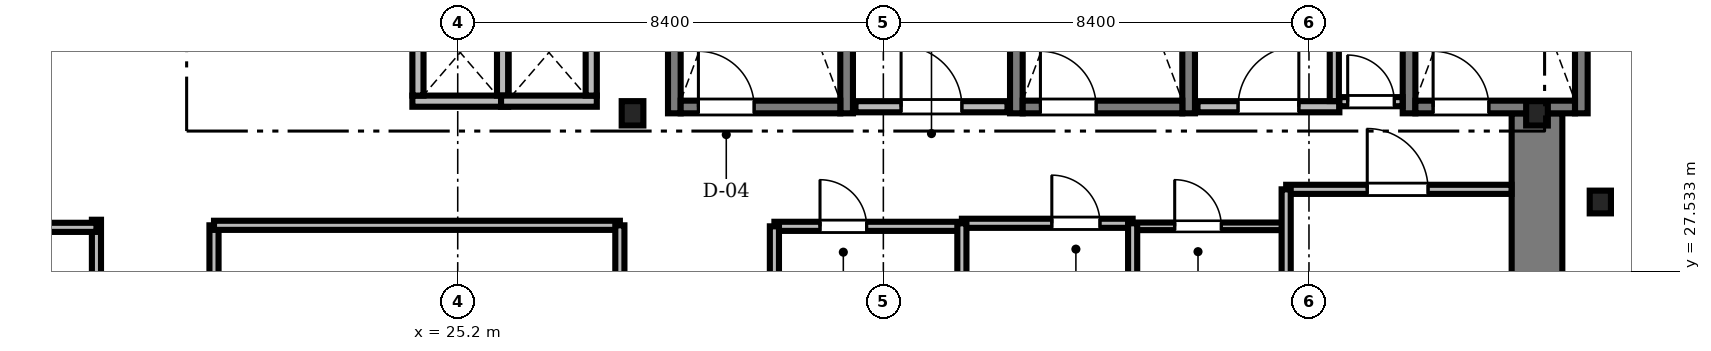
"""IFC4 building model, lengths in metres.
Left out: names, types, materials, properties, quantities, classifications, styles, units other than length and angle.
Written with IfcOpenShell. Run it as: python <this file> out.ifc"""

import sys

from ifc_helpers import new_model, si_unit, direction, frame, frame_2d, origin, origin_2d, place, context, subcontext, project, spatial, rectangle, i_section, extrude, source, transform, mapped, element, fill, save


model = new_model("IFC4")
c1 = context("Model", 3, precision=1e-05, world=origin(), true_north=direction((0.0, 1.0)))
c2 = subcontext(c1, "Body", "Model", "MODEL_VIEW")
j1 = project(units=[si_unit("LENGTHUNIT", "METRE"), si_unit("PLANEANGLEUNIT", "RADIAN")], contexts=[c1])
p1 = place(None, origin())
s1 = spatial("IfcSite", under=j1, at=p1, CompositionType="ELEMENT")
p2 = place(p1, origin())
s2 = spatial("IfcBuilding", under=s1, at=p2, CompositionType="ELEMENT")
p3 = place(p2, frame((0.0, 0.0, 89.65)))
s3 = spatial("IfcBuildingStorey", under=s2, at=p3, CompositionType="ELEMENT", Elevation=89.65)
m1 = source(origin(), c2, "Body", "SweptSolid", [
    extrude(rectangle(XDim=13.15, YDim=1.0, at=frame_2d((6.575, 0.0))), origin(), (0.0, 0.0, 1.0), 3.0),
])
p4 = place(p3, frame((46.5, 17.5, 0.0), z_axis=(0.0, 0.0, 1.0), x_axis=(0.0, 1.0, 0.0)))
e1 = element("IfcWall", 1, at=p4, inside=s3, PredefinedType="SHEAR", context=c2, shape_type="MappedRepresentation", body=[
    mapped(m1, transform((0.0, 0.0, 0.0), scale=1.0)),
])
m2 = source(origin(), c2, "Body", "SweptSolid", [
    extrude(i_section(OverallWidth=0.428, OverallDepth=0.481, WebThickness=0.04, FlangeThickness=0.063, FilletRadius=0.015, at=origin_2d()), origin(), (0.0, 0.0, 1.0), 3.0),
])
for number, where, z_axis, x_axis in (
    (2, (28.65, 30.65, 0.0), (0.0, 0.0, 1.0), (1.0, 0.0, 0.0)),
    (3, (46.5, 30.65, 0.0), (0.0, 0.0, 1.0), (1.0, 0.0, 0.0)),
):
    element("IfcColumn", number, at=place(p3, frame(where, z_axis=z_axis, x_axis=x_axis)), inside=s3, PredefinedType="COLUMN", context=c2, shape_type="MappedRepresentation", body=[
        mapped(m2, transform((0.0, 0.0, 0.0), scale=1.0)),
    ])
m3 = source(origin(), c2, "Body", "SweptSolid", [
    extrude(i_section(OverallWidth=0.419, OverallDepth=0.449, WebThickness=0.031, FlangeThickness=0.048, FilletRadius=0.015, at=origin_2d()), origin(), (0.0, 0.0, 1.0), 3.0),
])
p5 = place(p3, frame((47.75, 28.9, 0.0), z_axis=(0.0, 0.0, 1.0), x_axis=(1.0, 0.0, 0.0)))
e4 = element("IfcColumn", 4, at=p5, inside=s3, PredefinedType="COLUMN", context=c2, shape_type="MappedRepresentation", body=[
    mapped(m3, transform((0.0, 0.0, 0.0), scale=1.0)),
])
m4 = source(origin(), c2, "Body", "SweptSolid", [
    extrude(rectangle(XDim=9.15, YDim=0.25, at=frame_2d((4.575, 0.0))), origin(), (0.0, 0.0, 1.0), 3.45),
])
for number, where, z_axis, x_axis in (
    (5, (29.475, 30.65, 0.0), (0.0, 0.0, 1.0), (0.0, 1.0, 0.0)),
    (6, (32.875, 30.65, 0.0), (0.0, 0.0, 1.0), (0.0, 1.0, 0.0)),
):
    element("IfcWall", number, at=place(p3, frame(where, z_axis=z_axis, x_axis=x_axis)), inside=s3, PredefinedType="SOLIDWALL", context=c2, shape_type="MappedRepresentation", body=[
        mapped(m4, transform((0.0, 0.0, 0.0), scale=1.0)),
    ])
m5 = source(origin(), c2, "Body", "SweptSolid", [
    extrude(rectangle(XDim=3.15, YDim=0.25, at=frame_2d((1.575, 0.0))), origin(), (0.0, 0.0, 1.0), 3.45),
])
p6 = place(p3, frame((29.6, 30.775, 0.0), z_axis=(0.0, 0.0, 1.0), x_axis=(1.0, 0.0, 0.0)))
e7 = element("IfcWall", 7, at=p6, inside=s3, PredefinedType="SOLIDWALL", context=c2, shape_type="MappedRepresentation", body=[
    mapped(m5, transform((0.0, 0.0, 0.0), scale=1.0)),
])
m6 = source(origin(), c2, "Body", "SweptSolid", [
    extrude(rectangle(XDim=1.1, YDim=2.2, at=frame_2d((0.55, 1.1))), frame((0.0, 0.135, 0.0), z_axis=(0.0, -1.0, 0.0), x_axis=(1.0, 0.0, 0.0)), (0.0, 0.0, 1.0), 0.27),
])
p7 = place(p6, frame((0.35, 0.0, 0.0)))
e8 = element("IfcOpeningElement", 8, at=p7, cuts=e7, PredefinedType="OPENING", context=c2, shape_type="MappedRepresentation", body=[
    mapped(m6, transform((0.0, 0.0, 0.0), scale=1.0)),
])
for number, where, z_axis, x_axis in (
    (9, (36.225, 30.65, 0.0), (0.0, 0.0, 1.0), (0.0, 1.0, 0.0)),
    (10, (39.625, 30.65, 0.0), (0.0, 0.0, 1.0), (0.0, 1.0, 0.0)),
):
    element("IfcWall", number, at=place(p3, frame(where, z_axis=z_axis, x_axis=x_axis)), inside=s3, PredefinedType="SOLIDWALL", context=c2, shape_type="MappedRepresentation", body=[
        mapped(m4, transform((0.0, 0.0, 0.0), scale=1.0)),
    ])
p8 = place(p3, frame((36.35, 30.775, 0.0), z_axis=(0.0, 0.0, 1.0), x_axis=(1.0, 0.0, 0.0)))
e11 = element("IfcWall", 11, at=p8, inside=s3, PredefinedType="SOLIDWALL", context=c2, shape_type="MappedRepresentation", body=[
    mapped(m5, transform((0.0, 0.0, 0.0), scale=1.0)),
])
p9 = place(p8, frame((0.35, 0.0, 0.0)))
e12 = element("IfcOpeningElement", 12, at=p9, cuts=e11, PredefinedType="OPENING", context=c2, shape_type="MappedRepresentation", body=[
    mapped(m6, transform((0.0, 0.0, 0.0), scale=1.0)),
])
for number, where, z_axis, x_axis in (
    (13, (43.975, 30.65, 0.0), (0.0, 0.0, 1.0), (0.0, 1.0, 0.0)),
    (14, (47.375, 30.65, 0.0), (0.0, 0.0, 1.0), (0.0, 1.0, 0.0)),
):
    element("IfcWall", number, at=place(p3, frame(where, z_axis=z_axis, x_axis=x_axis)), inside=s3, PredefinedType="SOLIDWALL", context=c2, shape_type="MappedRepresentation", body=[
        mapped(m4, transform((0.0, 0.0, 0.0), scale=1.0)),
    ])
p10 = place(p3, frame((44.1, 30.775, 0.0), z_axis=(0.0, 0.0, 1.0), x_axis=(1.0, 0.0, 0.0)))
e15 = element("IfcWall", 15, at=p10, inside=s3, PredefinedType="SOLIDWALL", context=c2, shape_type="MappedRepresentation", body=[
    mapped(m5, transform((0.0, 0.0, 0.0), scale=1.0)),
])
p11 = place(p10, frame((0.35, 0.0, 0.0)))
e16 = element("IfcOpeningElement", 16, at=p11, cuts=e15, PredefinedType="OPENING", context=c2, shape_type="MappedRepresentation", body=[
    mapped(m6, transform((0.0, 0.0, 0.0), scale=1.0)),
])
m7 = source(origin(), c2, "Body", "SweptSolid", [
    extrude(rectangle(XDim=3.0, YDim=0.22, at=frame_2d((1.5, 0.0))), origin(), (0.0, 0.0, 1.0), 3.0),
])
p12 = place(p3, frame((33.05, 30.78, 0.0), z_axis=(0.0, 0.0, 1.0), x_axis=(1.0, 0.0, 0.0)))
e17 = element("IfcWall", 17, at=p12, inside=s3, PredefinedType="SOLIDWALL", context=c2, shape_type="MappedRepresentation", body=[
    mapped(m7, transform((0.0, 0.0, 0.0), scale=1.0)),
])
m8 = source(origin(), c2, "Body", "SweptSolid", [
    extrude(rectangle(XDim=1.2, YDim=2.2, at=frame_2d((0.6, 1.1))), frame((0.0, 0.12, 0.0), z_axis=(0.0, -1.0, 0.0), x_axis=(1.0, 0.0, 0.0)), (0.0, 0.0, 1.0), 0.24),
])
p13 = place(p12, frame((0.9, 0.0, 0.0)))
e18 = element("IfcOpeningElement", 18, at=p13, cuts=e17, PredefinedType="OPENING", context=c2, shape_type="MappedRepresentation", body=[
    mapped(m8, transform((0.0, 0.0, 0.0), scale=1.0)),
])
m9 = source(origin(), c2, "Body", "SweptSolid", [
    extrude(rectangle(XDim=2.8, YDim=0.22, at=frame_2d((1.4, 0.0))), origin(), (0.0, 0.0, 1.0), 3.0),
])
p14 = place(p3, frame((39.8, 30.78, 0.0), z_axis=(0.0, 0.0, 1.0), x_axis=(1.0, 0.0, 0.0)))
e19 = element("IfcWall", 19, at=p14, inside=s3, PredefinedType="SOLIDWALL", context=c2, shape_type="MappedRepresentation", body=[
    mapped(m9, transform((0.0, 0.0, 0.0), scale=1.0)),
])
p15 = place(p14, frame((0.8, 0.0, 0.0)))
e20 = element("IfcOpeningElement", 20, at=p15, cuts=e19, PredefinedType="OPENING", context=c2, shape_type="MappedRepresentation", body=[
    mapped(m8, transform((0.0, 0.0, 0.0), scale=1.0)),
])
m10 = source(origin(), c2, "Body", "SweptSolid", [
    extrude(rectangle(XDim=1.89, YDim=0.22, at=frame_2d((0.945, 0.0))), origin(), (0.0, 0.0, 1.0), 3.0),
])
p16 = place(p3, frame((24.305, 30.89, 0.0), z_axis=(0.0, 0.0, 1.0), x_axis=(1.0, 0.0, 0.0)))
e21 = element("IfcWall", 21, at=p16, inside=s3, PredefinedType="SOLIDWALL", context=c2, shape_type="MappedRepresentation", body=[
    mapped(m10, transform((0.0, 0.0, 0.0), scale=1.0)),
])
m11 = source(origin(), c2, "Body", "SweptSolid", [
    extrude(rectangle(XDim=1.7, YDim=0.22, at=frame_2d((0.85, 0.0))), origin(), (0.0, 0.0, 1.0), 3.0),
])
for number, where, z_axis, x_axis in (
    (22, (24.415, 31.0, 0.0), (0.0, 0.0, 1.0), (0.0, 1.0, 0.0)),
    (23, (26.085, 31.0, 0.0), (0.0, 0.0, 1.0), (0.0, 1.0, 0.0)),
):
    element("IfcWall", number, at=place(p3, frame(where, z_axis=z_axis, x_axis=x_axis)), inside=s3, PredefinedType="SOLIDWALL", context=c2, shape_type="MappedRepresentation", body=[
        mapped(m11, transform((0.0, 0.0, 0.0), scale=1.0)),
    ])
p17 = place(p3, frame((26.055, 30.89, 0.0), z_axis=(0.0, 0.0, 1.0), x_axis=(1.0, 0.0, 0.0)))
e24 = element("IfcWall", 24, at=p17, inside=s3, PredefinedType="SOLIDWALL", context=c2, shape_type="MappedRepresentation", body=[
    mapped(m10, transform((0.0, 0.0, 0.0), scale=1.0)),
])
p18 = place(p3, frame((27.835, 31.0, 0.0), z_axis=(0.0, 0.0, 1.0), x_axis=(0.0, 1.0, 0.0)))
e25 = element("IfcWall", 25, at=p18, inside=s3, PredefinedType="SOLIDWALL", context=c2, shape_type="MappedRepresentation", body=[
    mapped(m11, transform((0.0, 0.0, 0.0), scale=1.0)),
])
m12 = source(origin(), c2, "Body", "SweptSolid", [
    extrude(rectangle(XDim=13.89, YDim=0.18, at=frame_2d((6.945, 0.0))), origin(), (0.0, 0.0, 1.0), 2.442),
])
p19 = place(p3, frame((18.07, 14.66, 0.0), z_axis=(0.0, 0.0, 1.0), x_axis=(0.0, 1.0, 0.0)))
e26 = element("IfcWall", 26, at=p19, inside=s3, PredefinedType="PARTITIONING", context=c2, shape_type="MappedRepresentation", body=[
    mapped(m12, transform((0.0, 0.0, 0.0), scale=1.0)),
])
m13 = source(origin(), c2, "Body", "SweptSolid", [
    extrude(rectangle(XDim=1.05, YDim=2.2, at=frame_2d((0.525, 1.1))), frame((0.0, 0.1, 0.0), z_axis=(0.0, -1.0, 0.0), x_axis=(1.0, 0.0, 0.0)), (0.0, 0.0, 1.0), 0.2),
])
p20 = place(p19, frame((1.77, 0.0, 0.0)))
e27 = element("IfcOpeningElement", 27, at=p20, cuts=e26, PredefinedType="OPENING", context=c2, shape_type="MappedRepresentation", body=[
    mapped(m13, transform((0.0, 0.0, 0.0), scale=1.0)),
])
m14 = source(origin(), c2, "Body", "SweptSolid", [
    extrude(rectangle(XDim=0.95, YDim=2.15, at=frame_2d((0.475, 1.075))), frame((0.0, 0.1, 0.0), z_axis=(0.0, -1.0, 0.0), x_axis=(1.0, 0.0, 0.0)), (0.0, 0.0, 1.0), 0.2),
])
p21 = place(p19, frame((7.575, 0.0, 0.0)))
e28 = element("IfcOpeningElement", 28, at=p21, cuts=e26, PredefinedType="OPENING", context=c2, shape_type="MappedRepresentation", body=[
    mapped(m14, transform((0.0, 0.0, 0.0), scale=1.0)),
])
p22 = place(p19, frame((10.93, 0.0, 0.0)))
e29 = element("IfcOpeningElement", 29, at=p22, cuts=e26, PredefinedType="OPENING", context=c2, shape_type="MappedRepresentation", body=[
    mapped(m13, transform((0.0, 0.0, 0.0), scale=1.0)),
])
m15 = source(origin(), c2, "Body", "SweptSolid", [
    extrude(rectangle(XDim=4.448, YDim=0.18, at=frame_2d((2.224, 0.0))), origin(), (0.0, 0.0, 1.0), 2.632),
])
p23 = place(p3, frame((41.55, 29.15, 0.0), z_axis=(0.0, 0.0, 1.0), x_axis=(1.0, 0.0, 0.0)))
e30 = element("IfcWall", 30, at=p23, inside=s3, PredefinedType="PARTITIONING", context=c2, shape_type="MappedRepresentation", body=[
    mapped(m15, transform((0.0, 0.0, 0.0), scale=1.0)),
])
m16 = source(origin(), c2, "Body", "SweptSolid", [
    extrude(rectangle(XDim=1.2, YDim=2.2, at=frame_2d((0.6, 1.1))), frame((0.0, 0.1, 0.0), z_axis=(0.0, -1.0, 0.0), x_axis=(1.0, 0.0, 0.0)), (0.0, 0.0, 1.0), 0.2),
])
p24 = place(p23, frame((1.6, 0.0, 0.0)))
e31 = element("IfcOpeningElement", 31, at=p24, cuts=e30, PredefinedType="OPENING", context=c2, shape_type="MappedRepresentation", body=[
    mapped(m16, transform((0.0, 0.0, 0.0), scale=1.0)),
])
m17 = source(origin(), c2, "Body", "SweptSolid", [
    extrude(rectangle(XDim=4.24, YDim=0.18, at=frame_2d((2.12, 0.0))), origin(), (0.0, 0.0, 1.0), 2.442),
])
p25 = place(p3, frame((20.39, 24.2, 0.0), z_axis=(0.0, 0.0, 1.0), x_axis=(0.0, 1.0, 0.0)))
e32 = element("IfcWall", 32, at=p25, inside=s3, PredefinedType="PARTITIONING", context=c2, shape_type="MappedRepresentation", body=[
    mapped(m17, transform((0.0, 0.0, 0.0), scale=1.0)),
])
p26 = place(p25, frame((1.4, 0.0, 0.0)))
e33 = element("IfcOpeningElement", 33, at=p26, cuts=e32, PredefinedType="OPENING", context=c2, shape_type="MappedRepresentation", body=[
    mapped(m13, transform((0.0, 0.0, 0.0), scale=1.0)),
])
m18 = source(origin(), c2, "Body", "SweptSolid", [
    extrude(rectangle(XDim=3.7, YDim=0.18, at=frame_2d((1.85, 0.0))), origin(), (0.0, 0.0, 1.0), 2.632),
])
p27 = place(p3, frame((31.45, 28.42, 0.0), z_axis=(0.0, 0.0, 1.0), x_axis=(1.0, 0.0, 0.0)))
e34 = element("IfcWall", 34, at=p27, inside=s3, PredefinedType="PARTITIONING", context=c2, shape_type="MappedRepresentation", body=[
    mapped(m18, transform((0.0, 0.0, 0.0), scale=1.0)),
])
m19 = source(origin(), c2, "Body", "SweptSolid", [
    extrude(rectangle(XDim=0.92, YDim=2.1, at=frame_2d((0.46, 1.05))), frame((0.0, 0.1, 0.0), z_axis=(0.0, -1.0, 0.0), x_axis=(1.0, 0.0, 0.0)), (0.0, 0.0, 1.0), 0.2),
])
p28 = place(p27, frame((0.9, 0.0, 0.0)))
e35 = element("IfcOpeningElement", 35, at=p28, cuts=e34, PredefinedType="OPENING", context=c2, shape_type="MappedRepresentation", body=[
    mapped(m19, transform((0.0, 0.0, 0.0), scale=1.0)),
])
m20 = source(origin(), c2, "Body", "SweptSolid", [
    extrude(rectangle(XDim=3.37, YDim=0.18, at=frame_2d((1.685, 0.0))), origin(), (0.0, 0.0, 1.0), 3.0),
])
p29 = place(p3, frame((35.15, 28.48, 0.0), z_axis=(0.0, 0.0, 1.0), x_axis=(1.0, 0.0, 0.0)))
e36 = element("IfcWall", 36, at=p29, inside=s3, PredefinedType="PARTITIONING", context=c2, shape_type="MappedRepresentation", body=[
    mapped(m20, transform((0.0, 0.0, 0.0), scale=1.0)),
])
p30 = place(p29, frame((1.775, 0.0, 0.0)))
e37 = element("IfcOpeningElement", 37, at=p30, cuts=e36, PredefinedType="OPENING", context=c2, shape_type="MappedRepresentation", body=[
    mapped(m14, transform((0.0, 0.0, 0.0), scale=1.0)),
])
m21 = source(origin(), c2, "Body", "SweptSolid", [
    extrude(rectangle(XDim=3.0, YDim=0.15, at=frame_2d((1.5, 0.0))), origin(), (0.0, 0.0, 1.0), 3.0),
])
p31 = place(p3, frame((38.52, 28.42, 0.0), z_axis=(0.0, 0.0, 1.0), x_axis=(1.0, 0.0, 0.0)))
e38 = element("IfcWall", 38, at=p31, inside=s3, PredefinedType="PARTITIONING", context=c2, shape_type="MappedRepresentation", body=[
    mapped(m21, transform((0.0, 0.0, 0.0), scale=1.0)),
])
m22 = source(origin(), c2, "Body", "SweptSolid", [
    extrude(rectangle(XDim=0.92, YDim=2.1, at=frame_2d((0.46, 1.05))), frame((0.0, 0.085, 0.0), z_axis=(0.0, -1.0, 0.0), x_axis=(1.0, 0.0, 0.0)), (0.0, 0.0, 1.0), 0.17),
])
p32 = place(p31, frame((0.83, 0.0, 0.0)))
e39 = element("IfcOpeningElement", 39, at=p32, cuts=e38, PredefinedType="OPENING", context=c2, shape_type="MappedRepresentation", body=[
    mapped(m22, transform((0.0, 0.0, 0.0), scale=1.0)),
])
m23 = source(origin(), c2, "Body", "SweptSolid", [
    extrude(rectangle(XDim=1.248, YDim=0.18, at=frame_2d((0.624, 0.0))), origin(), (0.0, 0.0, 1.0), 3.0),
])
p33 = place(p3, frame((42.6, 30.88, 0.0), z_axis=(0.0, 0.0, 1.0), x_axis=(1.0, 0.0, 0.0)))
e40 = element("IfcWall", 40, at=p33, inside=s3, PredefinedType="PARTITIONING", context=c2, shape_type="MappedRepresentation", body=[
    mapped(m23, transform((0.0, 0.0, 0.0), scale=1.0)),
])
p34 = place(p33, frame((0.164, 0.0, 0.0)))
e41 = element("IfcOpeningElement", 41, at=p34, cuts=e40, PredefinedType="OPENING", context=c2, shape_type="MappedRepresentation", body=[
    mapped(m19, transform((0.0, 0.0, 0.0), scale=1.0)),
])
m24 = source(origin(), c2, "Body", "SweptSolid", [
    extrude(rectangle(XDim=15.84, YDim=0.18, at=frame_2d((7.92, 0.0))), origin(), (0.0, 0.0, 1.0), 2.276),
])
p35 = place(p3, frame((2.23, 28.4, 0.0), z_axis=(0.0, 0.0, 1.0), x_axis=(1.0, 0.0, 0.0)))
e42 = element("IfcWall", 42, at=p35, inside=s3, PredefinedType="PARTITIONING", context=c2, shape_type="MappedRepresentation", body=[
    mapped(m24, transform((0.0, 0.0, 0.0), scale=1.0)),
])
m25 = source(origin(), c2, "Body", "SweptSolid", [
    extrude(rectangle(XDim=8.01, YDim=0.18, at=frame_2d((4.005, 0.0))), origin(), (0.0, 0.0, 1.0), 3.0),
])
p36 = place(p3, frame((20.39, 28.44, 0.0), z_axis=(0.0, 0.0, 1.0), x_axis=(1.0, 0.0, 0.0)))
e43 = element("IfcWall", 43, at=p36, inside=s3, PredefinedType="PARTITIONING", context=c2, shape_type="MappedRepresentation", body=[
    mapped(m25, transform((0.0, 0.0, 0.0), scale=1.0)),
])
p37 = place(p3, frame((28.4, 24.2, 0.0), z_axis=(0.0, 0.0, 1.0), x_axis=(0.0, 1.0, 0.0)))
e44 = element("IfcWall", 44, at=p37, inside=s3, PredefinedType="PARTITIONING", context=c2, shape_type="MappedRepresentation", body=[
    mapped(m17, transform((0.0, 0.0, 0.0), scale=1.0)),
])
m26 = source(origin(), c2, "Body", "SweptSolid", [
    extrude(rectangle(XDim=2.35, YDim=0.18, at=frame_2d((1.175, 0.0))), origin(), (0.0, 0.0, 1.0), 2.442),
])
p38 = place(p3, frame((41.55, 26.8, 0.0), z_axis=(0.0, 0.0, 1.0), x_axis=(0.0, 1.0, 0.0)))
e45 = element("IfcWall", 45, at=p38, inside=s3, PredefinedType="PARTITIONING", context=c2, shape_type="MappedRepresentation", body=[
    mapped(m26, transform((0.0, 0.0, 0.0), scale=1.0)),
])
m27 = source(origin(), c2, "Body", "SweptSolid", [
    extrude(rectangle(XDim=1.858, YDim=0.18, at=frame_2d((0.929, 0.0))), origin(), (0.0, 0.0, 1.0), 3.0),
])
p39 = place(p3, frame((42.5, 30.892, 0.0), z_axis=(0.0, 0.0, 1.0), x_axis=(0.0, 1.0, 0.0)))
e46 = element("IfcWall", 46, at=p39, inside=s3, PredefinedType="PARTITIONING", context=c2, shape_type="MappedRepresentation", body=[
    mapped(m27, transform((0.0, 0.0, 0.0), scale=1.0)),
])
m28 = source(origin(), c2, "Body", "SweptSolid", [
    extrude(rectangle(XDim=1.66, YDim=0.18, at=frame_2d((0.83, 0.0))), origin(), (0.0, 0.0, 1.0), 2.542),
])
for number, where, z_axis, x_axis in (
    (47, (35.15, 26.82, 0.0), (0.0, 0.0, 1.0), (0.0, 1.0, 0.0)),
    (48, (38.52, 26.82, 0.0), (0.0, 0.0, 1.0), (0.0, 1.0, 0.0)),
):
    element("IfcWall", number, at=place(p3, frame(where, z_axis=z_axis, x_axis=x_axis)), inside=s3, PredefinedType="PARTITIONING", context=c2, shape_type="MappedRepresentation", body=[
        mapped(m28, transform((0.0, 0.0, 0.0), scale=1.0)),
    ])
m29 = source(origin(), c2, "Body", "SweptSolid", [
    extrude(rectangle(XDim=1.6, YDim=0.18, at=frame_2d((0.8, 0.0))), origin(), (0.0, 0.0, 1.0), 2.542),
])
p40 = place(p3, frame((31.45, 26.82, 0.0), z_axis=(0.0, 0.0, 1.0), x_axis=(0.0, 1.0, 0.0)))
e49 = element("IfcWall", 49, at=p40, inside=s3, PredefinedType="PARTITIONING", context=c2, shape_type="MappedRepresentation", body=[
    mapped(m29, transform((0.0, 0.0, 0.0), scale=1.0)),
])
m30 = source(origin(), c2, "Body", "SweptSolid", [
    extrude(rectangle(XDim=1.1, YDim=2.2, at=frame_2d((0.55, 1.1))), frame((0.0, 0.025, 0.0), z_axis=(0.0, -1.0, 0.0), x_axis=(1.0, 0.0, 0.0)), (0.0, 0.0, 1.0), 0.05),
])
p41 = place(p7, origin())
e50 = element("IfcDoor", 50, at=p41, inside=s3, OperationType="SINGLE_SWING_LEFT", PredefinedType="DOOR", context=c2, shape_type="MappedRepresentation", body=[
    mapped(m30, transform((0.0, 0.0, 0.0), scale=1.0)),
])
fill(e8, e50)
p42 = place(p9, origin())
e51 = element("IfcDoor", 51, at=p42, inside=s3, OperationType="SINGLE_SWING_LEFT", PredefinedType="DOOR", context=c2, shape_type="MappedRepresentation", body=[
    mapped(m30, transform((0.0, 0.0, 0.0), scale=1.0)),
])
fill(e12, e51)
p43 = place(p11, origin())
e52 = element("IfcDoor", 52, at=p43, inside=s3, OperationType="SINGLE_SWING_LEFT", PredefinedType="DOOR", context=c2, shape_type="MappedRepresentation", body=[
    mapped(m30, transform((0.0, 0.0, 0.0), scale=1.0)),
])
fill(e16, e52)
m31 = source(origin(), c2, "Body", "SweptSolid", [
    extrude(rectangle(XDim=1.2, YDim=2.2, at=frame_2d((0.6, 1.1))), frame((0.0, 0.025, 0.0), z_axis=(0.0, -1.0, 0.0), x_axis=(1.0, 0.0, 0.0)), (0.0, 0.0, 1.0), 0.05),
])
p44 = place(p13, origin())
e53 = element("IfcDoor", 53, at=p44, inside=s3, OperationType="SINGLE_SWING_LEFT", PredefinedType="DOOR", context=c2, shape_type="MappedRepresentation", body=[
    mapped(m31, transform((0.0, 0.0, 0.0), scale=1.0)),
])
fill(e18, e53)
p45 = place(p15, origin())
e54 = element("IfcDoor", 54, at=p45, inside=s3, OperationType="SINGLE_SWING_RIGHT", PredefinedType="DOOR", context=c2, shape_type="MappedRepresentation", body=[
    mapped(m31, transform((0.0, 0.0, 0.0), scale=1.0)),
])
fill(e20, e54)
p46 = place(p24, origin())
e55 = element("IfcDoor", 55, at=p46, inside=s3, OperationType="SINGLE_SWING_LEFT", PredefinedType="DOOR", context=c2, shape_type="MappedRepresentation", body=[
    mapped(m31, transform((0.0, 0.0, 0.0), scale=1.0)),
])
fill(e31, e55)
m32 = source(origin(), c2, "Body", "SweptSolid", [
    extrude(rectangle(XDim=0.92, YDim=2.1, at=frame_2d((0.46, 1.05))), frame((0.0, 0.025, 0.0), z_axis=(0.0, -1.0, 0.0), x_axis=(1.0, 0.0, 0.0)), (0.0, 0.0, 1.0), 0.05),
])
p47 = place(p28, origin())
e56 = element("IfcDoor", 56, at=p47, inside=s3, OperationType="SINGLE_SWING_LEFT", PredefinedType="DOOR", context=c2, shape_type="MappedRepresentation", body=[
    mapped(m32, transform((0.0, 0.0, 0.0), scale=1.0)),
])
fill(e35, e56)
m33 = source(origin(), c2, "Body", "SweptSolid", [
    extrude(rectangle(XDim=0.95, YDim=2.15, at=frame_2d((0.475, 1.075))), frame((0.0, 0.025, 0.0), z_axis=(0.0, -1.0, 0.0), x_axis=(1.0, 0.0, 0.0)), (0.0, 0.0, 1.0), 0.05),
])
p48 = place(p30, origin())
e57 = element("IfcDoor", 57, at=p48, inside=s3, OperationType="SINGLE_SWING_LEFT", PredefinedType="DOOR", context=c2, shape_type="MappedRepresentation", body=[
    mapped(m33, transform((0.0, 0.0, 0.0), scale=1.0)),
])
fill(e37, e57)
p49 = place(p32, origin())
e58 = element("IfcDoor", 58, at=p49, inside=s3, OperationType="SINGLE_SWING_LEFT", PredefinedType="DOOR", context=c2, shape_type="MappedRepresentation", body=[
    mapped(m32, transform((0.0, 0.0, 0.0), scale=1.0)),
])
fill(e39, e58)
p50 = place(p34, origin())
e59 = element("IfcDoor", 59, at=p50, inside=s3, OperationType="SINGLE_SWING_LEFT", PredefinedType="DOOR", context=c2, shape_type="MappedRepresentation", body=[
    mapped(m32, transform((0.0, 0.0, 0.0), scale=1.0)),
])
fill(e41, e59)
save(model, sys.argv[1])
